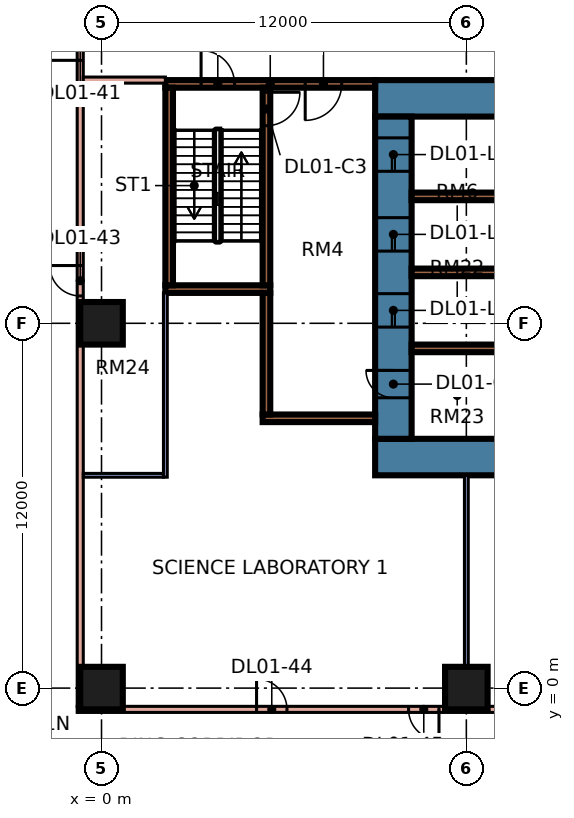
"""IFC4 building model, lengths in metres.
Left out: names, types, materials, properties, quantities, classifications, styles, units other than length and angle.
Written with IfcOpenShell. Run it as: python <this file> out.ifc"""

import sys

from ifc_helpers import new_model, si_unit, direction, frame, frame_2d, origin, origin_2d, place, context, subcontext, project, spatial, rectangle, extrude, element, fill, save


model = new_model("IFC4")
c1 = context("Model", 3, precision=1e-05, world=origin(), true_north=direction((0.0, 1.0)))
c2 = subcontext(c1, "Body", "Model", "MODEL_VIEW")
j1 = project(units=[si_unit("LENGTHUNIT", "METRE"), si_unit("PLANEANGLEUNIT", "RADIAN")], contexts=[c1])
p1 = place(None, origin())
s1 = spatial("IfcSite", under=j1, at=p1, CompositionType="ELEMENT")
p2 = place(p1, origin())
s2 = spatial("IfcBuilding", under=s1, at=p2, CompositionType="ELEMENT")
p3 = place(p2, frame((0.0, 0.0, 7.2)))
s3 = spatial("IfcBuildingStorey", under=s2, at=p3, CompositionType="ELEMENT", Elevation=7.2)
for number, where, z_axis, x_axis in (
    (1, (0.0, 0.0, 0.0), (0.0, 0.0, 1.0), (1.0, 0.0, 0.0)),
    (2, (12.0, 0.0, 0.0), (0.0, 0.0, 1.0), (1.0, 0.0, 0.0)),
    (3, (0.0, 12.0, 0.0), (0.0, 0.0, 1.0), (1.0, 0.0, 0.0)),
):
    element("IfcColumn", number, at=place(p3, frame(where, z_axis=z_axis, x_axis=x_axis)), inside=s3, PredefinedType="COLUMN", context=c2, shape_type="SweptSolid", body=[
        extrude(rectangle(XDim=1.4, YDim=1.4, at=origin_2d()), origin(), (0.0, 0.0, 1.0), 4.8),
    ])
p4 = place(p3, frame((9.0, 7.6, 0.0), z_axis=(0.0, 0.0, 1.0), x_axis=(1.0, 0.0, 0.0)))
e4 = element("IfcWall", 4, at=p4, inside=s3, PredefinedType="SHEAR", context=c2, shape_type="SweptSolid", body=[
    extrude(rectangle(XDim=25.0, YDim=1.2, at=frame_2d((12.5, 0.0))), origin(), (0.0, 0.0, 1.0), 4.8),
])
p5 = place(p3, frame((9.0, 19.4, 0.0), z_axis=(0.0, 0.0, 1.0), x_axis=(1.0, 0.0, 0.0)))
e5 = element("IfcWall", 5, at=p5, inside=s3, PredefinedType="SHEAR", context=c2, shape_type="SweptSolid", body=[
    extrude(rectangle(XDim=25.0, YDim=1.2, at=frame_2d((12.5, 0.0))), origin(), (0.0, 0.0, 1.0), 4.8),
])
p6 = place(p5, frame((19.1, 0.0, 0.0)))
e6 = element("IfcOpeningElement", 6, at=p6, cuts=e5, PredefinedType="OPENING", context=c2, shape_type="SweptSolid", body=[
    extrude(rectangle(XDim=1.8, YDim=2.4, at=frame_2d((0.9, 1.2))), frame((0.0, 0.61, 0.0), z_axis=(0.0, -1.0, 0.0), x_axis=(1.0, 0.0, 0.0)), (0.0, 0.0, 1.0), 1.22),
])
p7 = place(p3, frame((9.6, 8.2, 0.0), z_axis=(0.0, 0.0, 1.0), x_axis=(0.0, 1.0, 0.0)))
e7 = element("IfcWall", 7, at=p7, inside=s3, PredefinedType="SHEAR", context=c2, shape_type="SweptSolid", body=[
    extrude(rectangle(XDim=10.6, YDim=1.2, at=frame_2d((5.3, 0.0))), origin(), (0.0, 0.0, 1.0), 4.8),
])
p8 = place(p7, frame((3.675, 0.0, 0.0)))
e8 = element("IfcOpeningElement", 8, at=p8, cuts=e7, PredefinedType="OPENING", context=c2, shape_type="SweptSolid", body=[
    extrude(rectangle(XDim=1.1, YDim=2.2, at=frame_2d((0.55, 1.1))), frame((0.0, 0.61, 0.0), z_axis=(0.0, -1.0, 0.0), x_axis=(1.0, 0.0, 0.0)), (0.0, 0.0, 1.0), 1.22),
])
p9 = place(p7, frame((6.175, 0.0, 0.0)))
e9 = element("IfcOpeningElement", 9, at=p9, cuts=e7, PredefinedType="OPENING", context=c2, shape_type="SweptSolid", body=[
    extrude(rectangle(XDim=1.1, YDim=2.2, at=frame_2d((0.55, 1.1))), frame((0.0, 0.61, 0.0), z_axis=(0.0, -1.0, 0.0), x_axis=(1.0, 0.0, 0.0)), (0.0, 0.0, 1.0), 1.22),
])
p10 = place(p7, frame((8.8, 0.0, 0.0)))
e10 = element("IfcOpeningElement", 10, at=p10, cuts=e7, PredefinedType="OPENING", context=c2, shape_type="SweptSolid", body=[
    extrude(rectangle(XDim=1.1, YDim=2.2, at=frame_2d((0.55, 1.1))), frame((0.0, 0.61, 0.0), z_axis=(0.0, -1.0, 0.0), x_axis=(1.0, 0.0, 0.0)), (0.0, 0.0, 1.0), 1.22),
])
p11 = place(p7, frame((1.35, 0.0, 0.0)))
e11 = element("IfcOpeningElement", 11, at=p11, cuts=e7, PredefinedType="OPENING", context=c2, shape_type="SweptSolid", body=[
    extrude(rectangle(XDim=0.9, YDim=2.1, at=frame_2d((0.45, 1.05))), frame((0.0, 0.61, 0.0), z_axis=(0.0, -1.0, 0.0), x_axis=(1.0, 0.0, 0.0)), (0.0, 0.0, 1.0), 1.22),
])
for number, where, z_axis, x_axis in (
    (12, (10.2, 11.175, 0.0), (0.0, 0.0, 1.0), (1.0, 0.0, 0.0)),
    (13, (10.2, 13.675, 0.0), (0.0, 0.0, 1.0), (1.0, 0.0, 0.0)),
    (14, (10.2, 16.175, 0.0), (0.0, 0.0, 1.0), (1.0, 0.0, 0.0)),
):
    element("IfcWall", number, at=place(p3, frame(where, z_axis=z_axis, x_axis=x_axis)), inside=s3, PredefinedType="SHEAR", context=c2, shape_type="SweptSolid", body=[
        extrude(rectangle(XDim=3.0, YDim=0.25, at=frame_2d((1.5, 0.0))), origin(), (0.0, 0.0, 1.0), 4.8),
    ])
p12 = place(p3, frame((2.1, 19.875, 0.0), z_axis=(0.0, 0.0, 1.0), x_axis=(1.0, 0.0, 0.0)))
e15 = element("IfcWall", 15, at=p12, inside=s3, PredefinedType="SHEAR", context=c2, shape_type="SweptSolid", body=[
    extrude(rectangle(XDim=6.9, YDim=0.25, at=frame_2d((3.45, 0.0))), origin(), (0.0, 0.0, 1.0), 4.8),
])
p13 = place(p12, frame((1.175, 0.0, 0.0)))
e16 = element("IfcOpeningElement", 16, at=p13, cuts=e15, PredefinedType="OPENING", context=c2, shape_type="SweptSolid", body=[
    extrude(rectangle(XDim=1.1, YDim=2.2, at=frame_2d((0.55, 1.1))), frame((0.0, 0.135, 0.0), z_axis=(0.0, -1.0, 0.0), x_axis=(1.0, 0.0, 0.0)), (0.0, 0.0, 1.0), 0.27),
])
p14 = place(p12, frame((4.6, 0.0, 0.0)))
e17 = element("IfcOpeningElement", 17, at=p14, cuts=e15, PredefinedType="OPENING", context=c2, shape_type="SweptSolid", body=[
    extrude(rectangle(XDim=1.2, YDim=2.2, at=frame_2d((0.6, 1.1))), frame((0.0, 0.135, 0.0), z_axis=(0.0, -1.0, 0.0), x_axis=(1.0, 0.0, 0.0)), (0.0, 0.0, 1.0), 0.27),
])
p15 = place(p3, frame((2.1, 13.125, 0.0), z_axis=(0.0, 0.0, 1.0), x_axis=(1.0, 0.0, 0.0)))
e18 = element("IfcWall", 18, at=p15, inside=s3, PredefinedType="SHEAR", context=c2, shape_type="SweptSolid", body=[
    extrude(rectangle(XDim=3.45, YDim=0.25, at=frame_2d((1.725, 0.0))), origin(), (0.0, 0.0, 1.0), 4.8),
])
p16 = place(p3, frame((2.225, 13.25, 0.0), z_axis=(0.0, 0.0, 1.0), x_axis=(0.0, 1.0, 0.0)))
e19 = element("IfcWall", 19, at=p16, inside=s3, PredefinedType="SHEAR", context=c2, shape_type="SweptSolid", body=[
    extrude(rectangle(XDim=6.5, YDim=0.25, at=frame_2d((3.25, 0.0))), origin(), (0.0, 0.0, 1.0), 4.8),
])
p17 = place(p3, frame((5.425, 13.25, 0.0), z_axis=(0.0, 0.0, 1.0), x_axis=(0.0, 1.0, 0.0)))
e20 = element("IfcWall", 20, at=p17, inside=s3, PredefinedType="SHEAR", context=c2, shape_type="SweptSolid", body=[
    extrude(rectangle(XDim=6.5, YDim=0.25, at=frame_2d((3.25, 0.0))), origin(), (0.0, 0.0, 1.0), 4.8),
])
p18 = place(p17, frame((5.25, 0.0, 0.0)))
e21 = element("IfcOpeningElement", 21, at=p18, cuts=e20, PredefinedType="OPENING", context=c2, shape_type="SweptSolid", body=[
    extrude(rectangle(XDim=1.1, YDim=2.2, at=frame_2d((0.55, 1.1))), frame((0.0, 0.135, 0.0), z_axis=(0.0, -1.0, 0.0), x_axis=(1.0, 0.0, 0.0)), (0.0, 0.0, 1.0), 0.27),
])
p19 = place(p3, frame((5.3, 8.875, 0.0), z_axis=(0.0, 0.0, 1.0), x_axis=(1.0, 0.0, 0.0)))
e22 = element("IfcWall", 22, at=p19, inside=s3, PredefinedType="SHEAR", context=c2, shape_type="SweptSolid", body=[
    extrude(rectangle(XDim=3.7, YDim=0.25, at=frame_2d((1.85, 0.0))), origin(), (0.0, 0.0, 1.0), 4.8),
])
p20 = place(p3, frame((5.425, 9.0, 0.0), z_axis=(0.0, 0.0, 1.0), x_axis=(0.0, 1.0, 0.0)))
e23 = element("IfcWall", 23, at=p20, inside=s3, PredefinedType="SHEAR", context=c2, shape_type="SweptSolid", body=[
    extrude(rectangle(XDim=4.0, YDim=0.25, at=frame_2d((2.0, 0.0))), origin(), (0.0, 0.0, 1.0), 4.8),
])
p21 = place(p3, frame((-3.639, -1.518, 0.0), z_axis=(0.0, 0.0, 1.0), x_axis=(0.707106781187, -0.707106781187, 0.0)))
e24 = element("IfcWall", 24, at=p21, inside=s3, PredefinedType="SOLIDWALL", context=c2, shape_type="SweptSolid", body=[
    extrude(rectangle(XDim=3.0, YDim=0.15, at=frame_2d((1.5, 0.0))), origin(), (0.0, 0.0, 1.0), 4.4),
])
p22 = place(p21, frame((0.9, 0.0, 0.0)))
e25 = element("IfcOpeningElement", 25, at=p22, cuts=e24, PredefinedType="OPENING", context=c2, shape_type="SweptSolid", body=[
    extrude(rectangle(XDim=1.2, YDim=2.4, at=frame_2d((0.6, 1.2))), frame((0.0, 0.085, 0.0), z_axis=(0.0, -1.0, 0.0), x_axis=(1.0, 0.0, 0.0)), (0.0, 0.0, 1.0), 0.17),
])
p23 = place(p3, frame((7.447, -13.7, 0.0), z_axis=(0.0, 0.0, 1.0), x_axis=(-0.707106781187, 0.707106781187, 0.0)))
e26 = element("IfcWall", 26, at=p23, inside=s3, PredefinedType="PARAPET", context=c2, shape_type="SweptSolid", body=[
    extrude(rectangle(XDim=29.906, YDim=0.2, at=frame_2d((14.953, 0.0))), origin(), (0.0, 0.0, 1.0), 0.5),
])
p24 = place(p3, frame((-0.8, -0.7, 0.0), z_axis=(0.0, 0.0, 1.0), x_axis=(1.0, 0.0, 0.0)))
e27 = element("IfcWall", 27, at=p24, inside=s3, PredefinedType="PARTITIONING", context=c2, shape_type="SweptSolid", body=[
    extrude(rectangle(XDim=45.8, YDim=0.2, at=frame_2d((22.9, 0.0))), origin(), (0.0, 0.0, 1.0), 4.4),
])
p25 = place(p24, frame((40.9, 0.0, 0.0)))
e28 = element("IfcOpeningElement", 28, at=p25, cuts=e27, PredefinedType="OPENING", context=c2, shape_type="SweptSolid", body=[
    extrude(rectangle(XDim=1.0, YDim=2.1, at=frame_2d((0.5, 1.05))), frame((0.0, 0.11, 0.0), z_axis=(0.0, -1.0, 0.0), x_axis=(1.0, 0.0, 0.0)), (0.0, 0.0, 1.0), 0.22),
])
p26 = place(p24, frame((5.9, 0.0, 0.0)))
e29 = element("IfcOpeningElement", 29, at=p26, cuts=e27, PredefinedType="OPENING", context=c2, shape_type="SweptSolid", body=[
    extrude(rectangle(XDim=1.0, YDim=2.1, at=frame_2d((0.5, 1.05))), frame((0.0, 0.11, 0.0), z_axis=(0.0, -1.0, 0.0), x_axis=(1.0, 0.0, 0.0)), (0.0, 0.0, 1.0), 0.22),
])
p27 = place(p24, frame((10.9, 0.0, 0.0)))
e30 = element("IfcOpeningElement", 30, at=p27, cuts=e27, PredefinedType="OPENING", context=c2, shape_type="SweptSolid", body=[
    extrude(rectangle(XDim=1.0, YDim=2.1, at=frame_2d((0.5, 1.05))), frame((0.0, 0.11, 0.0), z_axis=(0.0, -1.0, 0.0), x_axis=(1.0, 0.0, 0.0)), (0.0, 0.0, 1.0), 0.22),
])
p28 = place(p24, frame((18.4, 0.0, 0.0)))
e31 = element("IfcOpeningElement", 31, at=p28, cuts=e27, PredefinedType="OPENING", context=c2, shape_type="SweptSolid", body=[
    extrude(rectangle(XDim=1.0, YDim=2.1, at=frame_2d((0.5, 1.05))), frame((0.0, 0.11, 0.0), z_axis=(0.0, -1.0, 0.0), x_axis=(1.0, 0.0, 0.0)), (0.0, 0.0, 1.0), 0.22),
])
p29 = place(p24, frame((30.4, 0.0, 0.0)))
e32 = element("IfcOpeningElement", 32, at=p29, cuts=e27, PredefinedType="OPENING", context=c2, shape_type="SweptSolid", body=[
    extrude(rectangle(XDim=1.0, YDim=2.1, at=frame_2d((0.5, 1.05))), frame((0.0, 0.11, 0.0), z_axis=(0.0, -1.0, 0.0), x_axis=(1.0, 0.0, 0.0)), (0.0, 0.0, 1.0), 0.22),
])
p30 = place(p3, frame((-0.7, -0.6, 0.0), z_axis=(0.0, 0.0, 1.0), x_axis=(0.0, 1.0, 0.0)))
e33 = element("IfcWall", 33, at=p30, inside=s3, PredefinedType="PARTITIONING", context=c2, shape_type="SweptSolid", body=[
    extrude(rectangle(XDim=23.6, YDim=0.2, at=frame_2d((11.8, 0.0))), origin(), (0.0, 0.0, 1.0), 4.4),
])
p31 = place(p30, frame((21.25, 0.0, 0.0)))
e34 = element("IfcOpeningElement", 34, at=p31, cuts=e33, PredefinedType="OPENING", context=c2, shape_type="SweptSolid", body=[
    extrude(rectangle(XDim=1.8, YDim=2.1, at=frame_2d((0.9, 1.05))), frame((0.0, 0.11, 0.0), z_axis=(0.0, -1.0, 0.0), x_axis=(1.0, 0.0, 0.0)), (0.0, 0.0, 1.0), 0.22),
])
p32 = place(p30, frame((13.5, 0.0, 0.0)))
e35 = element("IfcOpeningElement", 35, at=p32, cuts=e33, PredefinedType="OPENING", context=c2, shape_type="SweptSolid", body=[
    extrude(rectangle(XDim=1.0, YDim=2.1, at=frame_2d((0.5, 1.05))), frame((0.0, 0.11, 0.0), z_axis=(0.0, -1.0, 0.0), x_axis=(1.0, 0.0, 0.0)), (0.0, 0.0, 1.0), 0.22),
])
p33 = place(p3, frame((-0.6, 7.0, 0.0), z_axis=(0.0, 0.0, 1.0), x_axis=(1.0, 0.0, 0.0)))
e36 = element("IfcWall", 36, at=p33, inside=s3, PredefinedType="PARTITIONING", context=c2, shape_type="SweptSolid", body=[
    extrude(rectangle(XDim=2.638, YDim=0.125, at=frame_2d((1.319, 0.0))), origin(), (0.0, 0.0, 1.0), 4.4),
])
p34 = place(p3, frame((-0.6, 20.0, 0.0), z_axis=(0.0, 0.0, 1.0), x_axis=(1.0, 0.0, 0.0)))
e37 = element("IfcWall", 37, at=p34, inside=s3, PredefinedType="PARTITIONING", context=c2, shape_type="SweptSolid", body=[
    extrude(rectangle(XDim=2.7, YDim=0.2, at=frame_2d((1.35, 0.0))), origin(), (0.0, 0.0, 1.0), 4.4),
])
p35 = place(p3, frame((2.1, 6.938, 0.0), z_axis=(0.0, 0.0, 1.0), x_axis=(0.0, 1.0, 0.0)))
e38 = element("IfcWall", 38, at=p35, inside=s3, PredefinedType="PARTITIONING", context=c2, shape_type="SweptSolid", body=[
    extrude(rectangle(XDim=6.062, YDim=0.125, at=frame_2d((3.031, 0.0))), origin(), (0.0, 0.0, 1.0), 4.4),
])
p36 = place(p3, frame((12.0, -0.6, 0.0), z_axis=(0.0, 0.0, 1.0), x_axis=(0.0, 1.0, 0.0)))
e39 = element("IfcWall", 39, at=p36, inside=s3, PredefinedType="PARTITIONING", context=c2, shape_type="SweptSolid", body=[
    extrude(rectangle(XDim=7.6, YDim=0.125, at=frame_2d((3.8, 0.0))), origin(), (0.0, 0.0, 1.0), 4.4),
])
p37 = place(p8, origin())
e40 = element("IfcDoor", 40, at=p37, inside=s3, OperationType="DOUBLE_DOOR_SLIDING", PredefinedType="DOOR", context=c2, shape_type="SweptSolid", body=[
    extrude(rectangle(XDim=1.1, YDim=2.2, at=frame_2d((0.55, 1.1))), frame((0.0, 0.025, 0.0), z_axis=(0.0, -1.0, 0.0), x_axis=(1.0, 0.0, 0.0)), (0.0, 0.0, 1.0), 0.05),
])
fill(e8, e40)
p38 = place(p9, origin())
e41 = element("IfcDoor", 41, at=p38, inside=s3, OperationType="DOUBLE_DOOR_SLIDING", PredefinedType="DOOR", context=c2, shape_type="SweptSolid", body=[
    extrude(rectangle(XDim=1.1, YDim=2.2, at=frame_2d((0.55, 1.1))), frame((0.0, 0.025, 0.0), z_axis=(0.0, -1.0, 0.0), x_axis=(1.0, 0.0, 0.0)), (0.0, 0.0, 1.0), 0.05),
])
fill(e9, e41)
p39 = place(p10, origin())
e42 = element("IfcDoor", 42, at=p39, inside=s3, OperationType="DOUBLE_DOOR_SLIDING", PredefinedType="DOOR", context=c2, shape_type="SweptSolid", body=[
    extrude(rectangle(XDim=1.1, YDim=2.2, at=frame_2d((0.55, 1.1))), frame((0.0, 0.025, 0.0), z_axis=(0.0, -1.0, 0.0), x_axis=(1.0, 0.0, 0.0)), (0.0, 0.0, 1.0), 0.05),
])
fill(e10, e42)
p40 = place(p18, origin())
e43 = element("IfcDoor", 43, at=p40, inside=s3, OperationType="SINGLE_SWING_RIGHT", PredefinedType="DOOR", context=c2, shape_type="SweptSolid", body=[
    extrude(rectangle(XDim=1.1, YDim=2.2, at=frame_2d((0.55, 1.1))), frame((0.0, 0.025, 0.0), z_axis=(0.0, -1.0, 0.0), x_axis=(1.0, 0.0, 0.0)), (0.0, 0.0, 1.0), 0.05),
])
fill(e21, e43)
p41 = place(p11, frame((0.9, 0.0, 0.0), z_axis=(0.0, 0.0, 1.0), x_axis=(-1.0, 0.0, 0.0)))
e44 = element("IfcDoor", 44, at=p41, inside=s3, OperationType="SINGLE_SWING_RIGHT", PredefinedType="DOOR", context=c2, shape_type="SweptSolid", body=[
    extrude(rectangle(XDim=0.9, YDim=2.1, at=frame_2d((0.45, 1.05))), frame((0.0, 0.025, 0.0), z_axis=(0.0, -1.0, 0.0), x_axis=(1.0, 0.0, 0.0)), (0.0, 0.0, 1.0), 0.05),
])
fill(e11, e44)
p42 = place(p13, origin())
e45 = element("IfcDoor", 45, at=p42, inside=s3, OperationType="SINGLE_SWING_LEFT", PredefinedType="DOOR", context=c2, shape_type="SweptSolid", body=[
    extrude(rectangle(XDim=1.1, YDim=2.2, at=frame_2d((0.55, 1.1))), frame((0.0, 0.025, 0.0), z_axis=(0.0, -1.0, 0.0), x_axis=(1.0, 0.0, 0.0)), (0.0, 0.0, 1.0), 0.05),
])
fill(e16, e45)
p43 = place(p14, frame((1.2, 0.0, 0.0), z_axis=(0.0, 0.0, 1.0), x_axis=(-1.0, 0.0, 0.0)))
e46 = element("IfcDoor", 46, at=p43, inside=s3, OperationType="SINGLE_SWING_LEFT", PredefinedType="DOOR", context=c2, shape_type="SweptSolid", body=[
    extrude(rectangle(XDim=1.2, YDim=2.2, at=frame_2d((0.6, 1.1))), frame((0.0, 0.025, 0.0), z_axis=(0.0, -1.0, 0.0), x_axis=(1.0, 0.0, 0.0)), (0.0, 0.0, 1.0), 0.05),
])
fill(e17, e46)
p44 = place(p31, origin())
e47 = element("IfcDoor", 47, at=p44, inside=s3, OperationType="DOUBLE_DOOR_SINGLE_SWING", PredefinedType="DOOR", context=c2, shape_type="SweptSolid", body=[
    extrude(rectangle(XDim=1.8, YDim=2.1, at=frame_2d((0.9, 1.05))), frame((0.0, 0.025, 0.0), z_axis=(0.0, -1.0, 0.0), x_axis=(1.0, 0.0, 0.0)), (0.0, 0.0, 1.0), 0.05),
])
fill(e34, e47)
p45 = place(p32, frame((1.0, 0.0, 0.0), z_axis=(0.0, 0.0, 1.0), x_axis=(-1.0, 0.0, 0.0)))
e48 = element("IfcDoor", 48, at=p45, inside=s3, OperationType="SINGLE_SWING_RIGHT", PredefinedType="DOOR", context=c2, shape_type="SweptSolid", body=[
    extrude(rectangle(XDim=1.0, YDim=2.1, at=frame_2d((0.5, 1.05))), frame((0.0, 0.025, 0.0), z_axis=(0.0, -1.0, 0.0), x_axis=(1.0, 0.0, 0.0)), (0.0, 0.0, 1.0), 0.05),
])
fill(e35, e48)
p46 = place(p26, origin())
e49 = element("IfcDoor", 49, at=p46, inside=s3, OperationType="SINGLE_SWING_LEFT", PredefinedType="DOOR", context=c2, shape_type="SweptSolid", body=[
    extrude(rectangle(XDim=1.0, YDim=2.1, at=frame_2d((0.5, 1.05))), frame((0.0, 0.025, 0.0), z_axis=(0.0, -1.0, 0.0), x_axis=(1.0, 0.0, 0.0)), (0.0, 0.0, 1.0), 0.05),
])
fill(e29, e49)
p47 = place(p27, origin())
e50 = element("IfcDoor", 50, at=p47, inside=s3, OperationType="SINGLE_SWING_RIGHT", PredefinedType="DOOR", context=c2, shape_type="SweptSolid", body=[
    extrude(rectangle(XDim=1.0, YDim=2.1, at=frame_2d((0.5, 1.05))), frame((0.0, 0.025, 0.0), z_axis=(0.0, -1.0, 0.0), x_axis=(1.0, 0.0, 0.0)), (0.0, 0.0, 1.0), 0.05),
])
fill(e30, e50)
save(model, sys.argv[1])
